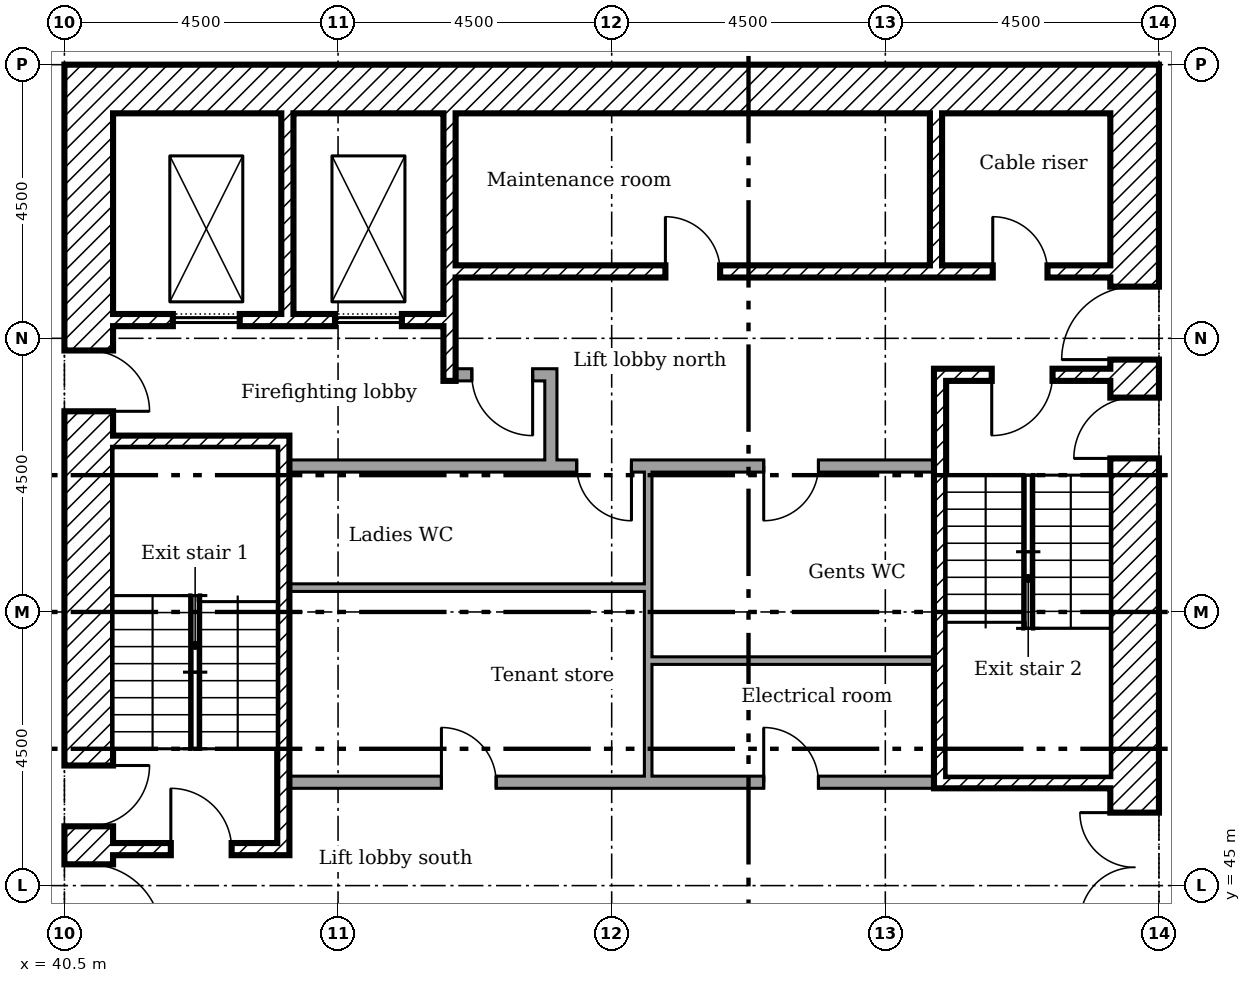
"""IFC4 building model, lengths in metres.
Left out: names, types, materials, properties, quantities, classifications, styles, units other than length and angle.
Written with IfcOpenShell. Run it as: python <this file> out.ifc"""

import sys

from ifc_helpers import new_model, si_unit, direction, frame, frame_2d, origin, place, context, subcontext, project, spatial, rectangle, extrude, element, fill, save


model = new_model("IFC4")
c1 = context("Model", 3, precision=1e-05, world=origin(), true_north=direction((0.0, 1.0)))
c2 = subcontext(c1, "Body", "Model", "MODEL_VIEW")
j1 = project(units=[si_unit("LENGTHUNIT", "METRE"), si_unit("PLANEANGLEUNIT", "RADIAN")], contexts=[c1])
p1 = place(None, origin())
s1 = spatial("IfcSite", under=j1, at=p1, CompositionType="ELEMENT")
p2 = place(p1, origin())
s2 = spatial("IfcBuilding", under=s1, at=p2, CompositionType="ELEMENT")
p3 = place(p2, frame((0.0, 0.0, 51.0)))
s3 = spatial("IfcBuildingStorey", under=s2, at=p3, CompositionType="ELEMENT", Elevation=51.0)
p4 = place(p3, frame((58.1, 40.5, 0.0), z_axis=(0.0, 0.0, 1.0), x_axis=(0.0, 1.0, 0.0)))
e1 = element("IfcWall", 1, at=p4, inside=s3, PredefinedType="SHEAR", context=c2, shape_type="SweptSolid", body=[
    extrude(rectangle(XDim=18.0, YDim=0.8, at=frame_2d((9.0, 0.0))), origin(), (0.0, 0.0, 1.0), 3.35),
])
p5 = place(p4, frame((13.15, 0.0, 0.0)))
e2 = element("IfcOpeningElement", 2, at=p5, cuts=e1, PredefinedType="OPENING", context=c2, shape_type="SweptSolid", body=[
    extrude(rectangle(XDim=1.2, YDim=2.1, at=frame_2d((0.6, 1.05))), frame((0.0, 0.41, 0.0), z_axis=(0.0, -1.0, 0.0), x_axis=(1.0, 0.0, 0.0)), (0.0, 0.0, 1.0), 0.82),
])
p6 = place(p4, frame((3.9, 0.0, 0.0)))
e3 = element("IfcOpeningElement", 3, at=p6, cuts=e1, PredefinedType="OPENING", context=c2, shape_type="SweptSolid", body=[
    extrude(rectangle(XDim=1.8, YDim=2.1, at=frame_2d((0.9, 1.05))), frame((0.0, 0.41, 0.0), z_axis=(0.0, -1.0, 0.0), x_axis=(1.0, 0.0, 0.0)), (0.0, 0.0, 1.0), 0.82),
])
p7 = place(p4, frame((11.525, 0.0, 0.0)))
e4 = element("IfcOpeningElement", 4, at=p7, cuts=e1, PredefinedType="OPENING", context=c2, shape_type="SweptSolid", body=[
    extrude(rectangle(XDim=1.0, YDim=2.1, at=frame_2d((0.5, 1.05))), frame((0.0, 0.41, 0.0), z_axis=(0.0, -1.0, 0.0), x_axis=(1.0, 0.0, 0.0)), (0.0, 0.0, 1.0), 0.82),
])
p8 = place(p3, frame((41.3, 58.1, 0.0)))
e5 = element("IfcWall", 5, at=p8, inside=s3, PredefinedType="SHEAR", context=c2, shape_type="SweptSolid", body=[
    extrude(rectangle(XDim=16.4, YDim=0.8, at=frame_2d((8.2, 0.0))), origin(), (0.0, 0.0, 1.0), 3.35),
])
p9 = place(p3, frame((40.9, 40.5, 0.0), z_axis=(0.0, 0.0, 1.0), x_axis=(0.0, 1.0, 0.0)))
e6 = element("IfcWall", 6, at=p9, inside=s3, PredefinedType="SHEAR", context=c2, shape_type="SweptSolid", body=[
    extrude(rectangle(XDim=18.0, YDim=0.8, at=frame_2d((9.0, 0.0))), origin(), (0.0, 0.0, 1.0), 3.35),
])
p10 = place(p9, frame((3.65, 0.0, 0.0)))
e7 = element("IfcOpeningElement", 7, at=p10, cuts=e6, PredefinedType="OPENING", context=c2, shape_type="SweptSolid", body=[
    extrude(rectangle(XDim=1.2, YDim=2.1, at=frame_2d((0.6, 1.05))), frame((0.0, 0.41, 0.0), z_axis=(0.0, -1.0, 0.0), x_axis=(1.0, 0.0, 0.0)), (0.0, 0.0, 1.0), 0.82),
])
p11 = place(p9, frame((5.475, 0.0, 0.0)))
e8 = element("IfcOpeningElement", 8, at=p11, cuts=e6, PredefinedType="OPENING", context=c2, shape_type="SweptSolid", body=[
    extrude(rectangle(XDim=1.0, YDim=2.1, at=frame_2d((0.5, 1.05))), frame((0.0, 0.41, 0.0), z_axis=(0.0, -1.0, 0.0), x_axis=(1.0, 0.0, 0.0)), (0.0, 0.0, 1.0), 0.82),
])
p12 = place(p9, frame((12.3, 0.0, 0.0)))
e9 = element("IfcOpeningElement", 9, at=p12, cuts=e6, PredefinedType="OPENING", context=c2, shape_type="SweptSolid", body=[
    extrude(rectangle(XDim=1.0, YDim=2.1, at=frame_2d((0.5, 1.05))), frame((0.0, 0.41, 0.0), z_axis=(0.0, -1.0, 0.0), x_axis=(1.0, 0.0, 0.0)), (0.0, 0.0, 1.0), 0.82),
])
p13 = place(p3, frame((44.167, 57.7, 0.0), z_axis=(0.0, 0.0, 1.0), x_axis=(0.0, -1.0, 0.0)))
e10 = element("IfcWall", 10, at=p13, inside=s3, PredefinedType="SHEAR", context=c2, shape_type="SweptSolid", body=[
    extrude(rectangle(XDim=3.3, YDim=0.2, at=frame_2d((1.65, 0.0))), origin(), (0.0, 0.0, 1.0), 3.35),
])
p14 = place(p3, frame((46.833, 57.7, 0.0), z_axis=(0.0, 0.0, 1.0), x_axis=(0.0, -1.0, 0.0)))
e11 = element("IfcWall", 11, at=p14, inside=s3, PredefinedType="SHEAR", context=c2, shape_type="SweptSolid", body=[
    extrude(rectangle(XDim=4.4, YDim=0.2, at=frame_2d((2.2, 0.0))), origin(), (0.0, 0.0, 1.0), 3.35),
])
p15 = place(p3, frame((54.833, 57.7, 0.0), z_axis=(0.0, 0.0, 1.0), x_axis=(0.0, -1.0, 0.0)))
e12 = element("IfcWall", 12, at=p15, inside=s3, PredefinedType="SHEAR", context=c2, shape_type="SweptSolid", body=[
    extrude(rectangle(XDim=2.5, YDim=0.2, at=frame_2d((1.25, 0.0))), origin(), (0.0, 0.0, 1.0), 3.35),
])
p16 = place(p3, frame((48.5, 51.9, 0.0), z_axis=(0.0, 0.0, 1.0), x_axis=(0.0, 1.0, 0.0)))
e13 = element("IfcWall", 13, at=p16, inside=s3, PredefinedType="PARTITIONING", context=c2, shape_type="SweptSolid", body=[
    extrude(rectangle(XDim=1.6, YDim=0.2, at=frame_2d((0.8, 0.0))), origin(), (0.0, 0.0, 1.0), 3.35),
])
p17 = place(p3, frame((46.933, 53.4, 0.0)))
e14 = element("IfcWall", 14, at=p17, inside=s3, PredefinedType="PARTITIONING", context=c2, shape_type="SweptSolid", body=[
    extrude(rectangle(XDim=1.467, YDim=0.2, at=frame_2d((0.733, 0.0))), origin(), (0.0, 0.0, 1.0), 3.35),
])
p18 = place(p17, frame((0.267, 0.0, 0.0)))
e15 = element("IfcOpeningElement", 15, at=p18, cuts=e14, PredefinedType="OPENING", context=c2, shape_type="SweptSolid", body=[
    extrude(rectangle(XDim=1.0, YDim=2.1, at=frame_2d((0.5, 1.05))), frame((0.0, 0.11, 0.0), z_axis=(0.0, -1.0, 0.0), x_axis=(1.0, 0.0, 0.0)), (0.0, 0.0, 1.0), 0.22),
])
p19 = place(p3, frame((46.933, 55.1, 0.0)))
e16 = element("IfcWall", 16, at=p19, inside=s3, PredefinedType="SHEAR", context=c2, shape_type="SweptSolid", body=[
    extrude(rectangle(XDim=10.767, YDim=0.2, at=frame_2d((5.383, 0.0))), origin(), (0.0, 0.0, 1.0), 3.35),
])
p20 = place(p19, frame((8.833, 0.0, 0.0)))
e17 = element("IfcOpeningElement", 17, at=p20, cuts=e16, PredefinedType="OPENING", context=c2, shape_type="SweptSolid", body=[
    extrude(rectangle(XDim=0.9, YDim=2.1, at=frame_2d((0.45, 1.05))), frame((0.0, 0.11, 0.0), z_axis=(0.0, -1.0, 0.0), x_axis=(1.0, 0.0, 0.0)), (0.0, 0.0, 1.0), 0.22),
])
p21 = place(p19, frame((3.45, 0.0, 0.0)))
e18 = element("IfcOpeningElement", 18, at=p21, cuts=e16, PredefinedType="OPENING", context=c2, shape_type="SweptSolid", body=[
    extrude(rectangle(XDim=0.9, YDim=2.1, at=frame_2d((0.45, 1.05))), frame((0.0, 0.11, 0.0), z_axis=(0.0, -1.0, 0.0), x_axis=(1.0, 0.0, 0.0)), (0.0, 0.0, 1.0), 0.22),
])
p22 = place(p3, frame((41.3, 54.3, 0.0)))
e19 = element("IfcWall", 19, at=p22, inside=s3, PredefinedType="SHEAR", context=c2, shape_type="SweptSolid", body=[
    extrude(rectangle(XDim=5.433, YDim=0.2, at=frame_2d((2.717, 0.0))), origin(), (0.0, 0.0, 1.0), 3.35),
])
p23 = place(p22, frame((0.983, 0.0, 0.0)))
e20 = element("IfcOpeningElement", 20, at=p23, cuts=e19, PredefinedType="OPENING", context=c2, shape_type="SweptSolid", body=[
    extrude(rectangle(XDim=1.1, YDim=2.1, at=frame_2d((0.55, 1.05))), frame((0.0, 0.11, 0.0), z_axis=(0.0, -1.0, 0.0), x_axis=(1.0, 0.0, 0.0)), (0.0, 0.0, 1.0), 0.22),
])
p24 = place(p22, frame((3.65, 0.0, 0.0)))
e21 = element("IfcOpeningElement", 21, at=p24, cuts=e19, PredefinedType="OPENING", context=c2, shape_type="SweptSolid", body=[
    extrude(rectangle(XDim=1.1, YDim=2.1, at=frame_2d((0.55, 1.05))), frame((0.0, 0.11, 0.0), z_axis=(0.0, -1.0, 0.0), x_axis=(1.0, 0.0, 0.0)), (0.0, 0.0, 1.0), 0.22),
])
p25 = place(p3, frame((44.1, 45.5, 0.0), z_axis=(0.0, 0.0, 1.0), x_axis=(0.0, 1.0, 0.0)))
e22 = element("IfcWall", 22, at=p25, inside=s3, PredefinedType="SHEAR", context=c2, shape_type="SweptSolid", body=[
    extrude(rectangle(XDim=6.9, YDim=0.2, at=frame_2d((3.45, 0.0))), origin(), (0.0, 0.0, 1.0), 3.35),
])
p26 = place(p3, frame((41.3, 52.3, 0.0)))
e23 = element("IfcWall", 23, at=p26, inside=s3, PredefinedType="SHEAR", context=c2, shape_type="SweptSolid", body=[
    extrude(rectangle(XDim=2.7, YDim=0.2, at=frame_2d((1.35, 0.0))), origin(), (0.0, 0.0, 1.0), 3.35),
])
p27 = place(p3, frame((41.3, 45.6, 0.0)))
e24 = element("IfcWall", 24, at=p27, inside=s3, PredefinedType="SHEAR", context=c2, shape_type="SweptSolid", body=[
    extrude(rectangle(XDim=2.7, YDim=0.2, at=frame_2d((1.35, 0.0))), origin(), (0.0, 0.0, 1.0), 3.35),
])
p28 = place(p27, frame((0.95, 0.0, 0.0)))
e25 = element("IfcOpeningElement", 25, at=p28, cuts=e24, PredefinedType="OPENING", context=c2, shape_type="SweptSolid", body=[
    extrude(rectangle(XDim=1.0, YDim=2.1, at=frame_2d((0.5, 1.05))), frame((0.0, 0.11, 0.0), z_axis=(0.0, -1.0, 0.0), x_axis=(1.0, 0.0, 0.0)), (0.0, 0.0, 1.0), 0.22),
])
p29 = place(p3, frame((54.8, 53.4, 0.0)))
e26 = element("IfcWall", 26, at=p29, inside=s3, PredefinedType="SHEAR", context=c2, shape_type="SweptSolid", body=[
    extrude(rectangle(XDim=2.9, YDim=0.2, at=frame_2d((1.45, 0.0))), origin(), (0.0, 0.0, 1.0), 3.35),
])
p30 = place(p29, frame((0.95, 0.0, 0.0)))
e27 = element("IfcOpeningElement", 27, at=p30, cuts=e26, PredefinedType="OPENING", context=c2, shape_type="SweptSolid", body=[
    extrude(rectangle(XDim=1.0, YDim=2.1, at=frame_2d((0.5, 1.05))), frame((0.0, 0.11, 0.0), z_axis=(0.0, -1.0, 0.0), x_axis=(1.0, 0.0, 0.0)), (0.0, 0.0, 1.0), 0.22),
])
p31 = place(p3, frame((54.8, 46.7, 0.0)))
e28 = element("IfcWall", 28, at=p31, inside=s3, PredefinedType="SHEAR", context=c2, shape_type="SweptSolid", body=[
    extrude(rectangle(XDim=2.9, YDim=0.2, at=frame_2d((1.45, 0.0))), origin(), (0.0, 0.0, 1.0), 3.35),
])
p32 = place(p3, frame((54.9, 46.8, 0.0), z_axis=(0.0, 0.0, 1.0), x_axis=(0.0, 1.0, 0.0)))
e29 = element("IfcWall", 29, at=p32, inside=s3, PredefinedType="SHEAR", context=c2, shape_type="SweptSolid", body=[
    extrude(rectangle(XDim=6.5, YDim=0.2, at=frame_2d((3.25, 0.0))), origin(), (0.0, 0.0, 1.0), 3.35),
])
p33 = place(p3, frame((44.2, 51.9, 0.0)))
e30 = element("IfcWall", 30, at=p33, inside=s3, PredefinedType="PARTITIONING", context=c2, shape_type="SweptSolid", body=[
    extrude(rectangle(XDim=10.6, YDim=0.2, at=frame_2d((5.3, 0.0))), origin(), (0.0, 0.0, 1.0), 3.35),
])
p34 = place(p33, frame((4.725, 0.0, 0.0)))
e31 = element("IfcOpeningElement", 31, at=p34, cuts=e30, PredefinedType="OPENING", context=c2, shape_type="SweptSolid", body=[
    extrude(rectangle(XDim=0.9, YDim=2.1, at=frame_2d((0.45, 1.05))), frame((0.0, 0.11, 0.0), z_axis=(0.0, -1.0, 0.0), x_axis=(1.0, 0.0, 0.0)), (0.0, 0.0, 1.0), 0.22),
])
p35 = place(p33, frame((7.8, 0.0, 0.0)))
e32 = element("IfcOpeningElement", 32, at=p35, cuts=e30, PredefinedType="OPENING", context=c2, shape_type="SweptSolid", body=[
    extrude(rectangle(XDim=0.9, YDim=2.1, at=frame_2d((0.45, 1.05))), frame((0.0, 0.11, 0.0), z_axis=(0.0, -1.0, 0.0), x_axis=(1.0, 0.0, 0.0)), (0.0, 0.0, 1.0), 0.22),
])
p36 = place(p3, frame((44.2, 46.7, 0.0)))
e33 = element("IfcWall", 33, at=p36, inside=s3, PredefinedType="PARTITIONING", context=c2, shape_type="SweptSolid", body=[
    extrude(rectangle(XDim=10.6, YDim=0.2, at=frame_2d((5.3, 0.0))), origin(), (0.0, 0.0, 1.0), 3.35),
])
p37 = place(p36, frame((2.5, 0.0, 0.0)))
e34 = element("IfcOpeningElement", 34, at=p37, cuts=e33, PredefinedType="OPENING", context=c2, shape_type="SweptSolid", body=[
    extrude(rectangle(XDim=0.9, YDim=2.1, at=frame_2d((0.45, 1.05))), frame((0.0, 0.11, 0.0), z_axis=(0.0, -1.0, 0.0), x_axis=(1.0, 0.0, 0.0)), (0.0, 0.0, 1.0), 0.22),
])
p38 = place(p36, frame((7.8, 0.0, 0.0)))
e35 = element("IfcOpeningElement", 35, at=p38, cuts=e33, PredefinedType="OPENING", context=c2, shape_type="SweptSolid", body=[
    extrude(rectangle(XDim=0.9, YDim=2.1, at=frame_2d((0.45, 1.05))), frame((0.0, 0.11, 0.0), z_axis=(0.0, -1.0, 0.0), x_axis=(1.0, 0.0, 0.0)), (0.0, 0.0, 1.0), 0.22),
])
p39 = place(p3, frame((50.1, 46.8, 0.0), z_axis=(0.0, 0.0, 1.0), x_axis=(0.0, 1.0, 0.0)))
e36 = element("IfcWall", 36, at=p39, inside=s3, PredefinedType="PARTITIONING", context=c2, shape_type="SweptSolid", body=[
    extrude(rectangle(XDim=1.962, YDim=0.125, at=frame_2d((0.981, 0.0))), origin(), (0.0, 0.0, 1.0), 3.35),
])
p40 = place(p3, frame((54.8, 48.7, 0.0), z_axis=(0.0, 0.0, 1.0), x_axis=(-1.0, 0.0, 0.0)))
e37 = element("IfcWall", 37, at=p40, inside=s3, PredefinedType="PARTITIONING", context=c2, shape_type="SweptSolid", body=[
    extrude(rectangle(XDim=4.637, YDim=0.125, at=frame_2d((2.319, 0.0))), origin(), (0.0, 0.0, 1.0), 3.35),
])
p41 = place(p3, frame((50.1, 48.7, 0.0), z_axis=(0.0, 0.0, 1.0), x_axis=(0.0, 1.0, 0.0)))
e38 = element("IfcWall", 38, at=p41, inside=s3, PredefinedType="PARTITIONING", context=c2, shape_type="SweptSolid", body=[
    extrude(rectangle(XDim=1.262, YDim=0.125, at=frame_2d((0.631, 0.0))), origin(), (0.0, 0.0, 1.0), 3.35),
])
p42 = place(p3, frame((50.038, 49.9, 0.0), z_axis=(0.0, 0.0, 1.0), x_axis=(-1.0, 0.0, 0.0)))
e39 = element("IfcWall", 39, at=p42, inside=s3, PredefinedType="PARTITIONING", context=c2, shape_type="SweptSolid", body=[
    extrude(rectangle(XDim=5.838, YDim=0.125, at=frame_2d((2.919, 0.0))), origin(), (0.0, 0.0, 1.0), 3.35),
])
p43 = place(p3, frame((50.1, 49.9, 0.0), z_axis=(0.0, 0.0, 1.0), x_axis=(0.0, 1.0, 0.0)))
e40 = element("IfcWall", 40, at=p43, inside=s3, PredefinedType="PARTITIONING", context=c2, shape_type="SweptSolid", body=[
    extrude(rectangle(XDim=1.9, YDim=0.125, at=frame_2d((0.95, 0.0))), origin(), (0.0, 0.0, 1.0), 3.35),
])
p44 = place(p5, origin())
e41 = element("IfcDoor", 41, at=p44, inside=s3, OperationType="SINGLE_SWING_RIGHT", PredefinedType="DOOR", context=c2, shape_type="SweptSolid", body=[
    extrude(rectangle(XDim=1.2, YDim=2.1, at=frame_2d((0.6, 1.05))), frame((0.0, 0.025, 0.0), z_axis=(0.0, -1.0, 0.0), x_axis=(1.0, 0.0, 0.0)), (0.0, 0.0, 1.0), 0.05),
])
fill(e2, e41)
p45 = place(p6, origin())
e42 = element("IfcDoor", 42, at=p45, inside=s3, OperationType="DOUBLE_DOOR_SINGLE_SWING", PredefinedType="DOOR", context=c2, shape_type="SweptSolid", body=[
    extrude(rectangle(XDim=1.8, YDim=2.1, at=frame_2d((0.9, 1.05))), frame((0.0, 0.025, 0.0), z_axis=(0.0, -1.0, 0.0), x_axis=(1.0, 0.0, 0.0)), (0.0, 0.0, 1.0), 0.05),
])
fill(e3, e42)
p46 = place(p10, frame((1.2, 0.0, 0.0), x_axis=(-1.0, 0.0, 0.0)))
e43 = element("IfcDoor", 43, at=p46, inside=s3, OperationType="SINGLE_SWING_LEFT", PredefinedType="DOOR", context=c2, shape_type="SweptSolid", body=[
    extrude(rectangle(XDim=1.2, YDim=2.1, at=frame_2d((0.6, 1.05))), frame((0.0, 0.025, 0.0), z_axis=(0.0, -1.0, 0.0), x_axis=(1.0, 0.0, 0.0)), (0.0, 0.0, 1.0), 0.05),
])
fill(e7, e43)
p47 = place(p28, origin())
e44 = element("IfcDoor", 44, at=p47, inside=s3, OperationType="SINGLE_SWING_RIGHT", PredefinedType="DOOR", context=c2, shape_type="SweptSolid", body=[
    extrude(rectangle(XDim=1.0, YDim=2.1, at=frame_2d((0.5, 1.05))), frame((0.0, 0.025, 0.0), z_axis=(0.0, -1.0, 0.0), x_axis=(1.0, 0.0, 0.0)), (0.0, 0.0, 1.0), 0.05),
])
fill(e25, e44)
p48 = place(p11, frame((1.0, 0.0, 0.0), x_axis=(-1.0, 0.0, 0.0)))
e45 = element("IfcDoor", 45, at=p48, inside=s3, OperationType="SINGLE_SWING_RIGHT", PredefinedType="DOOR", context=c2, shape_type="SweptSolid", body=[
    extrude(rectangle(XDim=1.0, YDim=2.1, at=frame_2d((0.5, 1.05))), frame((0.0, 0.025, 0.0), z_axis=(0.0, -1.0, 0.0), x_axis=(1.0, 0.0, 0.0)), (0.0, 0.0, 1.0), 0.05),
])
fill(e8, e45)
p49 = place(p30, frame((1.0, 0.0, 0.0), x_axis=(-1.0, 0.0, 0.0)))
e46 = element("IfcDoor", 46, at=p49, inside=s3, OperationType="SINGLE_SWING_LEFT", PredefinedType="DOOR", context=c2, shape_type="SweptSolid", body=[
    extrude(rectangle(XDim=1.0, YDim=2.1, at=frame_2d((0.5, 1.05))), frame((0.0, 0.025, 0.0), z_axis=(0.0, -1.0, 0.0), x_axis=(1.0, 0.0, 0.0)), (0.0, 0.0, 1.0), 0.05),
])
fill(e27, e46)
p50 = place(p7, origin())
e47 = element("IfcDoor", 47, at=p50, inside=s3, OperationType="SINGLE_SWING_RIGHT", PredefinedType="DOOR", context=c2, shape_type="SweptSolid", body=[
    extrude(rectangle(XDim=1.0, YDim=2.1, at=frame_2d((0.5, 1.05))), frame((0.0, 0.025, 0.0), z_axis=(0.0, -1.0, 0.0), x_axis=(1.0, 0.0, 0.0)), (0.0, 0.0, 1.0), 0.05),
])
fill(e4, e47)
p51 = place(p18, frame((1.0, 0.0, 0.0), x_axis=(-1.0, 0.0, 0.0)))
e48 = element("IfcDoor", 48, at=p51, inside=s3, OperationType="SINGLE_SWING_RIGHT", PredefinedType="DOOR", context=c2, shape_type="SweptSolid", body=[
    extrude(rectangle(XDim=1.0, YDim=2.1, at=frame_2d((0.5, 1.05))), frame((0.0, 0.025, 0.0), z_axis=(0.0, -1.0, 0.0), x_axis=(1.0, 0.0, 0.0)), (0.0, 0.0, 1.0), 0.05),
])
fill(e15, e48)
p52 = place(p12, frame((1.0, 0.0, 0.0), x_axis=(-1.0, 0.0, 0.0)))
e49 = element("IfcDoor", 49, at=p52, inside=s3, OperationType="SINGLE_SWING_LEFT", PredefinedType="DOOR", context=c2, shape_type="SweptSolid", body=[
    extrude(rectangle(XDim=1.0, YDim=2.1, at=frame_2d((0.5, 1.05))), frame((0.0, 0.025, 0.0), z_axis=(0.0, -1.0, 0.0), x_axis=(1.0, 0.0, 0.0)), (0.0, 0.0, 1.0), 0.05),
])
fill(e9, e49)
p53 = place(p20, origin())
e50 = element("IfcDoor", 50, at=p53, inside=s3, OperationType="SINGLE_SWING_RIGHT", PredefinedType="DOOR", context=c2, shape_type="SweptSolid", body=[
    extrude(rectangle(XDim=0.9, YDim=2.1, at=frame_2d((0.45, 1.05))), frame((0.0, 0.025, 0.0), z_axis=(0.0, -1.0, 0.0), x_axis=(1.0, 0.0, 0.0)), (0.0, 0.0, 1.0), 0.05),
])
fill(e17, e50)
p54 = place(p21, origin())
e51 = element("IfcDoor", 51, at=p54, inside=s3, OperationType="SINGLE_SWING_RIGHT", PredefinedType="DOOR", context=c2, shape_type="SweptSolid", body=[
    extrude(rectangle(XDim=0.9, YDim=2.1, at=frame_2d((0.45, 1.05))), frame((0.0, 0.025, 0.0), z_axis=(0.0, -1.0, 0.0), x_axis=(1.0, 0.0, 0.0)), (0.0, 0.0, 1.0), 0.05),
])
fill(e18, e51)
p55 = place(p37, origin())
e52 = element("IfcDoor", 52, at=p55, inside=s3, OperationType="SINGLE_SWING_RIGHT", PredefinedType="DOOR", context=c2, shape_type="SweptSolid", body=[
    extrude(rectangle(XDim=0.9, YDim=2.1, at=frame_2d((0.45, 1.05))), frame((0.0, 0.025, 0.0), z_axis=(0.0, -1.0, 0.0), x_axis=(1.0, 0.0, 0.0)), (0.0, 0.0, 1.0), 0.05),
])
fill(e34, e52)
p56 = place(p34, frame((0.9, 0.0, 0.0), x_axis=(-1.0, 0.0, 0.0)))
e53 = element("IfcDoor", 53, at=p56, inside=s3, OperationType="SINGLE_SWING_RIGHT", PredefinedType="DOOR", context=c2, shape_type="SweptSolid", body=[
    extrude(rectangle(XDim=0.9, YDim=2.1, at=frame_2d((0.45, 1.05))), frame((0.0, 0.025, 0.0), z_axis=(0.0, -1.0, 0.0), x_axis=(1.0, 0.0, 0.0)), (0.0, 0.0, 1.0), 0.05),
])
fill(e31, e53)
p57 = place(p38, origin())
e54 = element("IfcDoor", 54, at=p57, inside=s3, OperationType="SINGLE_SWING_RIGHT", PredefinedType="DOOR", context=c2, shape_type="SweptSolid", body=[
    extrude(rectangle(XDim=0.9, YDim=2.1, at=frame_2d((0.45, 1.05))), frame((0.0, 0.025, 0.0), z_axis=(0.0, -1.0, 0.0), x_axis=(1.0, 0.0, 0.0)), (0.0, 0.0, 1.0), 0.05),
])
fill(e35, e54)
p58 = place(p35, frame((0.9, 0.0, 0.0), x_axis=(-1.0, 0.0, 0.0)))
e55 = element("IfcDoor", 55, at=p58, inside=s3, OperationType="SINGLE_SWING_LEFT", PredefinedType="DOOR", context=c2, shape_type="SweptSolid", body=[
    extrude(rectangle(XDim=0.9, YDim=2.1, at=frame_2d((0.45, 1.05))), frame((0.0, 0.025, 0.0), z_axis=(0.0, -1.0, 0.0), x_axis=(1.0, 0.0, 0.0)), (0.0, 0.0, 1.0), 0.05),
])
fill(e32, e55)
p59 = place(p23, origin())
e56 = element("IfcDoor", 56, at=p59, inside=s3, OperationType="SLIDING_TO_LEFT", PredefinedType="DOOR", context=c2, shape_type="SweptSolid", body=[
    extrude(rectangle(XDim=1.1, YDim=2.1, at=frame_2d((0.55, 1.05))), frame((0.0, 0.025, 0.0), z_axis=(0.0, -1.0, 0.0), x_axis=(1.0, 0.0, 0.0)), (0.0, 0.0, 1.0), 0.05),
])
fill(e20, e56)
p60 = place(p24, origin())
e57 = element("IfcDoor", 57, at=p60, inside=s3, OperationType="SLIDING_TO_LEFT", PredefinedType="DOOR", context=c2, shape_type="SweptSolid", body=[
    extrude(rectangle(XDim=1.1, YDim=2.1, at=frame_2d((0.55, 1.05))), frame((0.0, 0.025, 0.0), z_axis=(0.0, -1.0, 0.0), x_axis=(1.0, 0.0, 0.0)), (0.0, 0.0, 1.0), 0.05),
])
fill(e21, e57)
save(model, sys.argv[1])
